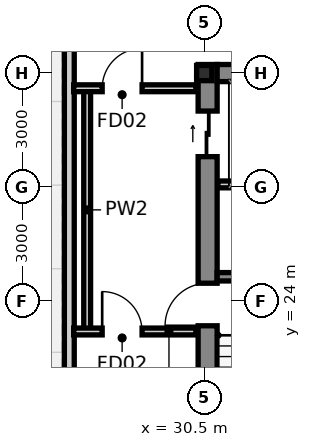
"""IFC4 building model, lengths in metres.
Left out: names, types, materials, properties, quantities, classifications, styles, units other than length and angle.
Written with IfcOpenShell. Run it as: python <this file> out.ifc"""

import sys

from ifc_helpers import new_model, si_unit, direction, frame, frame_2d, origin, origin_2d, place, context, subcontext, project, spatial, rectangle, i_section, extrude, source, transform, mapped, element, fill, save


model = new_model("IFC4")
c1 = context("Model", 3, precision=1e-05, world=origin(), true_north=direction((0.0, 1.0)))
c2 = subcontext(c1, "Body", "Model", "MODEL_VIEW")
j1 = project(units=[si_unit("LENGTHUNIT", "METRE"), si_unit("PLANEANGLEUNIT", "RADIAN")], contexts=[c1])
p1 = place(None, origin())
s1 = spatial("IfcSite", under=j1, at=p1, CompositionType="ELEMENT")
p2 = place(p1, origin())
s2 = spatial("IfcBuilding", under=s1, at=p2, CompositionType="ELEMENT")
p3 = place(p2, frame((0.0, 0.0, 150.05)))
s3 = spatial("IfcBuildingStorey", under=s2, at=p3, CompositionType="ELEMENT", Elevation=150.05)
m1 = source(origin(), c2, "Body", "SweptSolid", [
    extrude(i_section(OverallWidth=0.4, OverallDepth=0.4, WebThickness=0.02, FlangeThickness=0.032, at=origin_2d()), origin(), (0.0, 0.0, 1.0), 4.8),
])
p4 = place(p3, frame((30.5, 30.0, 0.0), z_axis=(0.0, 0.0, 1.0), x_axis=(1.0, 0.0, 0.0)))
e1 = element("IfcColumn", 1, at=p4, inside=s3, PredefinedType="COLUMN", context=c2, shape_type="MappedRepresentation", body=[
    mapped(m1, transform((0.0, 0.0, 0.0), scale=1.0)),
])
p5 = place(p3, frame((30.59, 16.95, 0.0), z_axis=(0.0, 0.0, 1.0), x_axis=(0.0, 1.0, 0.0)))
e2 = element("IfcWall", 2, at=p5, inside=s3, PredefinedType="SHEAR", context=c2, shape_type="SweptSolid", body=[
    extrude(rectangle(XDim=13.275, YDim=0.5, at=frame_2d((6.638, 0.0))), origin(), (0.0, 0.0, 1.0), 4.8),
])
p6 = place(p5, frame((6.4, 0.0, 0.0)))
e3 = element("IfcOpeningElement", 3, at=p6, cuts=e2, PredefinedType="OPENING", context=c2, shape_type="SweptSolid", body=[
    extrude(rectangle(XDim=1.12, YDim=2.15, at=frame_2d((0.56, 1.075))), frame((0.0, 0.262, 0.0), z_axis=(0.0, -1.0, 0.0), x_axis=(1.0, 0.0, 0.0)), (0.0, 0.0, 1.0), 0.524),
])
p7 = place(p5, frame((10.85, 0.0, 0.0)))
e4 = element("IfcOpeningElement", 4, at=p7, cuts=e2, PredefinedType="OPENING", context=c2, shape_type="SweptSolid", body=[
    extrude(rectangle(XDim=1.2, YDim=2.2, at=frame_2d((0.6, 1.1))), frame((0.0, 0.262, 0.0), z_axis=(0.0, -1.0, 0.0), x_axis=(1.0, 0.0, 0.0)), (0.0, 0.0, 1.0), 0.524),
])
p8 = place(p3, frame((30.84, 30.0, 0.0), z_axis=(0.0, 0.0, 1.0), x_axis=(1.0, 0.0, 0.0)))
e5 = element("IfcWall", 5, at=p8, inside=s3, PredefinedType="SHEAR", context=c2, shape_type="SweptSolid", body=[
    extrude(rectangle(XDim=2.9, YDim=0.45, at=frame_2d((1.45, 0.0))), origin(), (0.0, 0.0, 1.0), 4.8),
])
p9 = place(p3, frame((30.84, 24.64, 0.0), z_axis=(0.0, 0.0, 1.0), x_axis=(1.0, 0.0, 0.0)))
e6 = element("IfcWall", 6, at=p9, inside=s3, PredefinedType="SHEAR", context=c2, shape_type="SweptSolid", body=[
    extrude(rectangle(XDim=2.9, YDim=0.22, at=frame_2d((1.45, 0.0))), origin(), (0.0, 0.0, 1.0), 4.8),
])
p10 = place(p3, frame((26.95, 15.5, 0.0), z_axis=(0.0, 0.0, 1.0), x_axis=(0.0, 1.0, 0.0)))
e7 = element("IfcWall", 7, at=p10, inside=s3, PredefinedType="STANDARD", context=c2, shape_type="SweptSolid", body=[
    extrude(rectangle(XDim=17.0, YDim=0.26, at=frame_2d((8.5, 0.0))), origin(), (0.0, 0.0, 1.0), 4.228),
])
p11 = place(p10, frame((3.5, 0.0, 0.0)))
e8 = element("IfcOpeningElement", 8, at=p11, cuts=e7, PredefinedType="OPENING", context=c2, shape_type="SweptSolid", body=[
    extrude(rectangle(XDim=1.1, YDim=2.2, at=frame_2d((0.55, 1.1))), frame((0.0, 0.142, 0.0), z_axis=(0.0, -1.0, 0.0), x_axis=(1.0, 0.0, 0.0)), (0.0, 0.0, 1.0), 0.284),
])
p12 = place(p3, frame((27.42, 23.2, 0.0), z_axis=(0.0, 0.0, 1.0), x_axis=(0.0, 1.0, 0.0)))
e9 = element("IfcWall", 9, at=p12, inside=s3, PredefinedType="PARTITIONING", context=c2, shape_type="SweptSolid", body=[
    extrude(rectangle(XDim=6.4, YDim=0.18, at=frame_2d((3.2, 0.0))), origin(), (0.0, 0.0, 1.0), 4.228),
])
p13 = place(p3, frame((27.065, 23.2, 0.0), z_axis=(0.0, 0.0, 1.0), x_axis=(1.0, 0.0, 0.0)))
e10 = element("IfcWall", 10, at=p13, inside=s3, PredefinedType="PARTITIONING", context=c2, shape_type="SweptSolid", body=[
    extrude(rectangle(XDim=3.215, YDim=0.18, at=frame_2d((1.607, 0.0))), origin(), (0.0, 0.0, 1.0), 4.55),
])
p14 = place(p13, frame((0.75, 0.0, 0.0)))
e11 = element("IfcOpeningElement", 11, at=p14, cuts=e10, PredefinedType="OPENING", context=c2, shape_type="SweptSolid", body=[
    extrude(rectangle(XDim=1.05, YDim=2.15, at=frame_2d((0.525, 1.075))), frame((0.0, 0.102, 0.0), z_axis=(0.0, -1.0, 0.0), x_axis=(1.0, 0.0, 0.0)), (0.0, 0.0, 1.0), 0.204),
])
p15 = place(p3, frame((27.065, 29.6, 0.0), z_axis=(0.0, 0.0, 1.0), x_axis=(1.0, 0.0, 0.0)))
e12 = element("IfcWall", 12, at=p15, inside=s3, PredefinedType="PARTITIONING", context=c2, shape_type="SweptSolid", body=[
    extrude(rectangle(XDim=3.215, YDim=0.18, at=frame_2d((1.607, 0.0))), origin(), (0.0, 0.0, 1.0), 4.074),
])
p16 = place(p15, frame((0.75, 0.0, 0.0)))
e13 = element("IfcOpeningElement", 13, at=p16, cuts=e12, PredefinedType="OPENING", context=c2, shape_type="SweptSolid", body=[
    extrude(rectangle(XDim=1.05, YDim=2.15, at=frame_2d((0.525, 1.075))), frame((0.0, 0.102, 0.0), z_axis=(0.0, -1.0, 0.0), x_axis=(1.0, 0.0, 0.0)), (0.0, 0.0, 1.0), 0.204),
])
p17 = place(p3, frame((30.86, 27.07, 0.0), z_axis=(0.0, 0.0, 1.0), x_axis=(1.0, 0.0, 0.0)))
e14 = element("IfcWall", 14, at=p17, inside=s3, PredefinedType="PARTITIONING", context=c2, shape_type="SweptSolid", body=[
    extrude(rectangle(XDim=2.9, YDim=0.18, at=frame_2d((1.45, 0.0))), origin(), (0.0, 0.0, 1.0), 4.55),
])
p18 = place(p6, origin())
e15 = element("IfcDoor", 15, at=p18, inside=s3, OperationType="SINGLE_SWING_LEFT", PredefinedType="DOOR", context=c2, shape_type="SweptSolid", body=[
    extrude(rectangle(XDim=1.12, YDim=2.15, at=frame_2d((0.56, 1.075))), frame((0.0, 0.025, 0.0), z_axis=(0.0, -1.0, 0.0), x_axis=(1.0, 0.0, 0.0)), (0.0, 0.0, 1.0), 0.05),
])
fill(e3, e15)
p19 = place(p7, origin())
e16 = element("IfcDoor", 16, at=p19, inside=s3, OperationType="SLIDING_TO_LEFT", PredefinedType="DOOR", context=c2, shape_type="SweptSolid", body=[
    extrude(rectangle(XDim=1.2, YDim=2.2, at=frame_2d((0.6, 1.1))), frame((0.0, 0.025, 0.0), z_axis=(0.0, -1.0, 0.0), x_axis=(1.0, 0.0, 0.0)), (0.0, 0.0, 1.0), 0.05),
])
fill(e4, e16)
p20 = place(p14, origin())
e17 = element("IfcDoor", 17, at=p20, inside=s3, OperationType="SINGLE_SWING_LEFT", PredefinedType="DOOR", context=c2, shape_type="SweptSolid", body=[
    extrude(rectangle(XDim=1.05, YDim=2.15, at=frame_2d((0.525, 1.075))), frame((0.0, 0.025, 0.0), z_axis=(0.0, -1.0, 0.0), x_axis=(1.0, 0.0, 0.0)), (0.0, 0.0, 1.0), 0.05),
])
fill(e11, e17)
p21 = place(p16, origin())
e18 = element("IfcDoor", 18, at=p21, inside=s3, OperationType="SINGLE_SWING_RIGHT", PredefinedType="DOOR", context=c2, shape_type="SweptSolid", body=[
    extrude(rectangle(XDim=1.05, YDim=2.15, at=frame_2d((0.525, 1.075))), frame((0.0, 0.025, 0.0), z_axis=(0.0, -1.0, 0.0), x_axis=(1.0, 0.0, 0.0)), (0.0, 0.0, 1.0), 0.05),
])
fill(e13, e18)
save(model, sys.argv[1])
